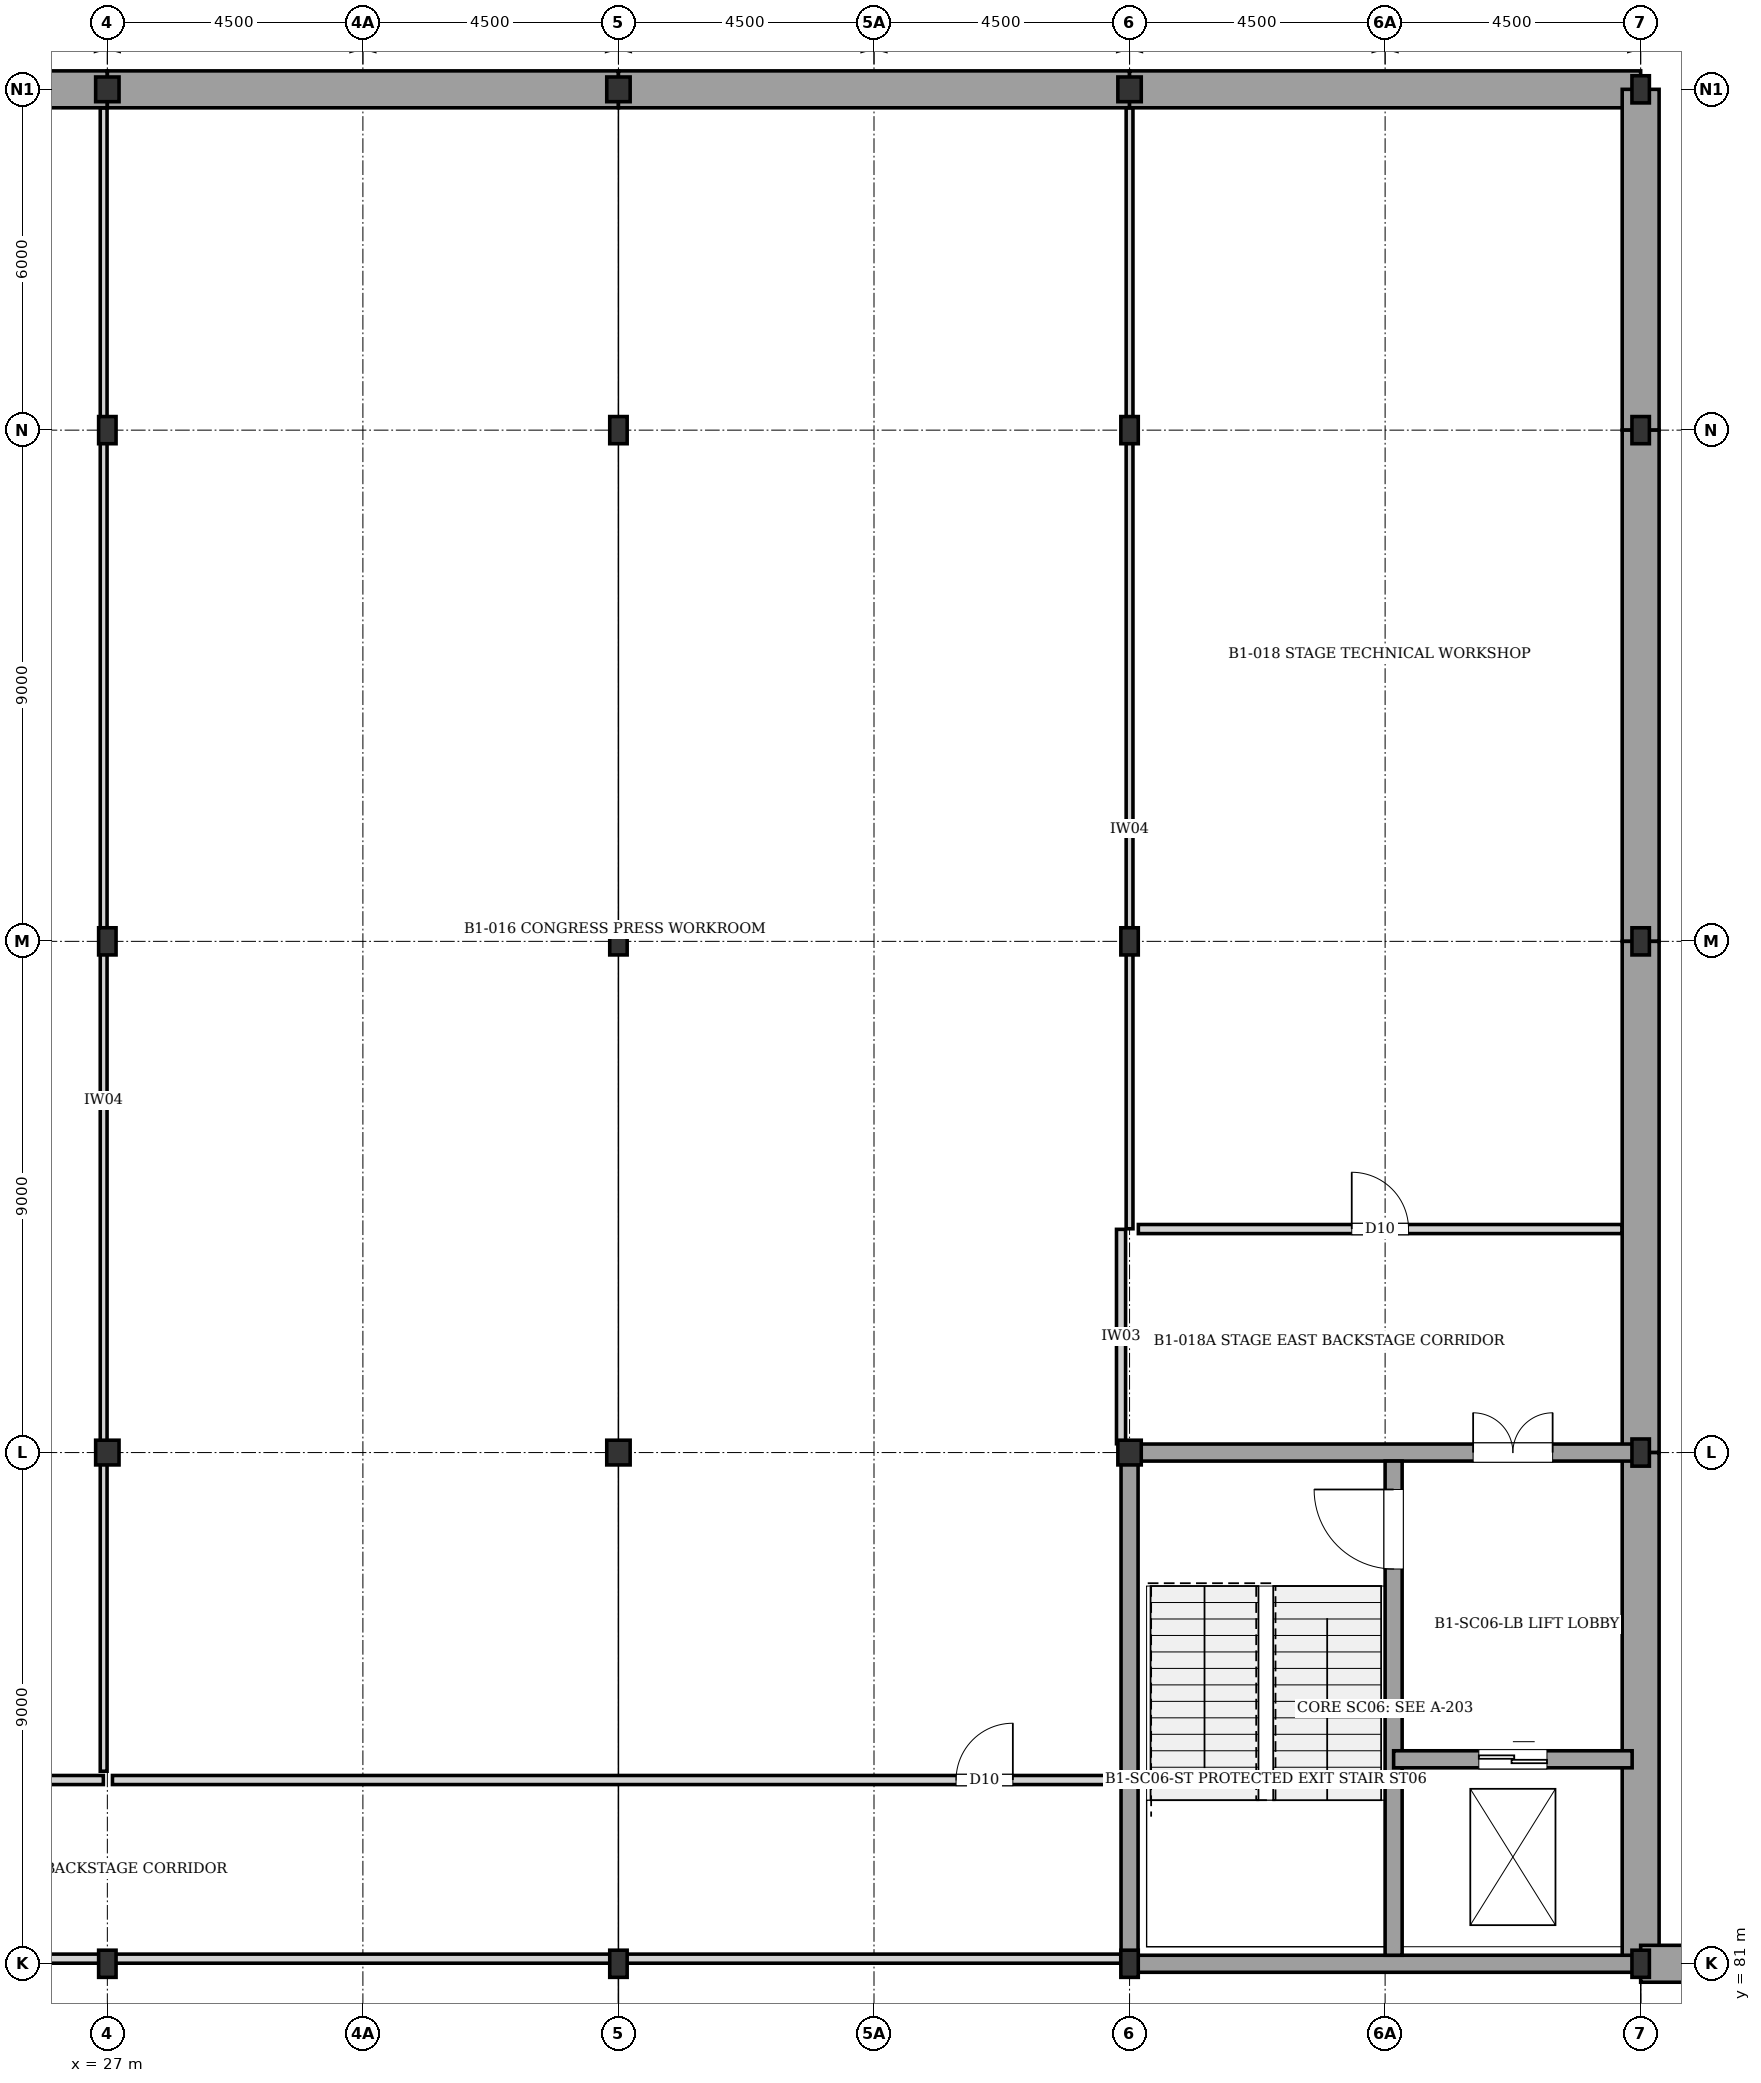
"""IFC4 building model, lengths in metres.
Left out: names, types, materials, properties, quantities, classifications, styles, units other than length and angle.
Written with IfcOpenShell. Run it as: python <this file> out.ifc"""

import sys

from ifc_helpers import new_model, si_unit, direction, frame, frame_2d, origin, origin_2d, place, context, subcontext, project, spatial, rectangle, i_section, extrude, element, fill, save


model = new_model("IFC4")
c1 = context("Model", 3, precision=1e-05, world=origin(), true_north=direction((0.0, 1.0)))
c2 = subcontext(c1, "Body", "Model", "MODEL_VIEW")
j1 = project(units=[si_unit("LENGTHUNIT", "METRE"), si_unit("PLANEANGLEUNIT", "RADIAN")], contexts=[c1])
p1 = place(None, origin())
s1 = spatial("IfcSite", under=j1, at=p1, CompositionType="ELEMENT")
p2 = place(p1, origin())
s2 = spatial("IfcBuilding", under=s1, at=p2, CompositionType="ELEMENT")
p3 = place(p2, frame((0.0, 0.0, -4.48)))
s3 = spatial("IfcBuildingStorey", under=s2, at=p3, CompositionType="ELEMENT", Elevation=-4.48)
p4 = place(p3, frame((27.0, 81.0, 0.0), z_axis=(0.0, 0.0, 1.0), x_axis=(1.0, 0.0, 0.0)))
e1 = element("IfcColumn", 1, at=p4, inside=s3, PredefinedType="COLUMN", context=c2, shape_type="SweptSolid", body=[
    extrude(i_section(OverallWidth=0.307, OverallDepth=0.478, WebThickness=0.021, FlangeThickness=0.04, at=origin_2d()), origin(), (0.0, 0.0, 1.0), 4.48),
])
p5 = place(p3, frame((27.0, 90.0, 0.0), z_axis=(0.0, 0.0, 1.0), x_axis=(1.0, 0.0, 0.0)))
e2 = element("IfcColumn", 2, at=p5, inside=s3, PredefinedType="COLUMN", context=c2, shape_type="SweptSolid", body=[
    extrude(i_section(OverallWidth=0.412, OverallDepth=0.435, WebThickness=0.027, FlangeThickness=0.046, at=origin_2d()), origin(), (0.0, 0.0, 1.0), 4.48),
])
for number, where, z_axis, x_axis in (
    (3, (27.0, 99.0, 0.0), (0.0, 0.0, 1.0), (1.0, 0.0, 0.0)),
    (4, (27.0, 108.0, 0.0), (0.0, 0.0, 1.0), (1.0, 0.0, 0.0)),
):
    element("IfcColumn", number, at=place(p3, frame(where, z_axis=z_axis, x_axis=x_axis)), inside=s3, PredefinedType="COLUMN", context=c2, shape_type="SweptSolid", body=[
        extrude(i_section(OverallWidth=0.307, OverallDepth=0.478, WebThickness=0.021, FlangeThickness=0.04, at=origin_2d()), origin(), (0.0, 0.0, 1.0), 4.48),
    ])
p6 = place(p3, frame((27.0, 114.0, 0.0), z_axis=(0.0, 0.0, 1.0), x_axis=(1.0, 0.0, 0.0)))
e5 = element("IfcColumn", 5, at=p6, inside=s3, PredefinedType="COLUMN", context=c2, shape_type="SweptSolid", body=[
    extrude(i_section(OverallWidth=0.412, OverallDepth=0.435, WebThickness=0.027, FlangeThickness=0.046, at=origin_2d()), origin(), (0.0, 0.0, 1.0), 4.48),
])
p7 = place(p3, frame((36.0, 81.0, 0.0), z_axis=(0.0, 0.0, 1.0), x_axis=(1.0, 0.0, 0.0)))
e6 = element("IfcColumn", 6, at=p7, inside=s3, PredefinedType="COLUMN", context=c2, shape_type="SweptSolid", body=[
    extrude(i_section(OverallWidth=0.307, OverallDepth=0.478, WebThickness=0.021, FlangeThickness=0.04, at=origin_2d()), origin(), (0.0, 0.0, 1.0), 4.48),
])
p8 = place(p3, frame((36.0, 90.0, 0.0), z_axis=(0.0, 0.0, 1.0), x_axis=(1.0, 0.0, 0.0)))
e7 = element("IfcColumn", 7, at=p8, inside=s3, PredefinedType="COLUMN", context=c2, shape_type="SweptSolid", body=[
    extrude(i_section(OverallWidth=0.412, OverallDepth=0.435, WebThickness=0.027, FlangeThickness=0.046, at=origin_2d()), origin(), (0.0, 0.0, 1.0), 4.48),
])
for number, where, z_axis, x_axis in (
    (8, (36.0, 99.0, 0.0), (0.0, 0.0, 1.0), (1.0, 0.0, 0.0)),
    (9, (36.0, 108.0, 0.0), (0.0, 0.0, 1.0), (1.0, 0.0, 0.0)),
):
    element("IfcColumn", number, at=place(p3, frame(where, z_axis=z_axis, x_axis=x_axis)), inside=s3, PredefinedType="COLUMN", context=c2, shape_type="SweptSolid", body=[
        extrude(i_section(OverallWidth=0.307, OverallDepth=0.478, WebThickness=0.021, FlangeThickness=0.04, at=origin_2d()), origin(), (0.0, 0.0, 1.0), 4.48),
    ])
p9 = place(p3, frame((36.0, 114.0, 0.0), z_axis=(0.0, 0.0, 1.0), x_axis=(1.0, 0.0, 0.0)))
e10 = element("IfcColumn", 10, at=p9, inside=s3, PredefinedType="COLUMN", context=c2, shape_type="SweptSolid", body=[
    extrude(i_section(OverallWidth=0.412, OverallDepth=0.435, WebThickness=0.027, FlangeThickness=0.046, at=origin_2d()), origin(), (0.0, 0.0, 1.0), 4.48),
])
p10 = place(p3, frame((45.0, 81.0, 0.0), z_axis=(0.0, 0.0, 1.0), x_axis=(1.0, 0.0, 0.0)))
e11 = element("IfcColumn", 11, at=p10, inside=s3, PredefinedType="COLUMN", context=c2, shape_type="SweptSolid", body=[
    extrude(i_section(OverallWidth=0.307, OverallDepth=0.478, WebThickness=0.021, FlangeThickness=0.04, at=origin_2d()), origin(), (0.0, 0.0, 1.0), 4.48),
])
p11 = place(p3, frame((45.0, 90.0, 0.0), z_axis=(0.0, 0.0, 1.0), x_axis=(1.0, 0.0, 0.0)))
e12 = element("IfcColumn", 12, at=p11, inside=s3, PredefinedType="COLUMN", context=c2, shape_type="SweptSolid", body=[
    extrude(i_section(OverallWidth=0.412, OverallDepth=0.435, WebThickness=0.027, FlangeThickness=0.046, at=origin_2d()), origin(), (0.0, 0.0, 1.0), 4.48),
])
for number, where, z_axis, x_axis in (
    (13, (45.0, 99.0, 0.0), (0.0, 0.0, 1.0), (1.0, 0.0, 0.0)),
    (14, (45.0, 108.0, 0.0), (0.0, 0.0, 1.0), (1.0, 0.0, 0.0)),
):
    element("IfcColumn", number, at=place(p3, frame(where, z_axis=z_axis, x_axis=x_axis)), inside=s3, PredefinedType="COLUMN", context=c2, shape_type="SweptSolid", body=[
        extrude(i_section(OverallWidth=0.307, OverallDepth=0.478, WebThickness=0.021, FlangeThickness=0.04, at=origin_2d()), origin(), (0.0, 0.0, 1.0), 4.48),
    ])
p12 = place(p3, frame((45.0, 114.0, 0.0), z_axis=(0.0, 0.0, 1.0), x_axis=(1.0, 0.0, 0.0)))
e15 = element("IfcColumn", 15, at=p12, inside=s3, PredefinedType="COLUMN", context=c2, shape_type="SweptSolid", body=[
    extrude(i_section(OverallWidth=0.412, OverallDepth=0.435, WebThickness=0.027, FlangeThickness=0.046, at=origin_2d()), origin(), (0.0, 0.0, 1.0), 4.48),
])
for number, where, z_axis, x_axis in (
    (16, (54.0, 81.0, 0.0), (0.0, 0.0, 1.0), (1.0, 0.0, 0.0)),
    (17, (54.0, 90.0, 0.0), (0.0, 0.0, 1.0), (1.0, 0.0, 0.0)),
    (18, (54.0, 99.0, 0.0), (0.0, 0.0, 1.0), (1.0, 0.0, 0.0)),
    (19, (54.0, 108.0, 0.0), (0.0, 0.0, 1.0), (1.0, 0.0, 0.0)),
    (20, (54.0, 114.0, 0.0), (0.0, 0.0, 1.0), (1.0, 0.0, 0.0)),
):
    element("IfcColumn", number, at=place(p3, frame(where, z_axis=z_axis, x_axis=x_axis)), inside=s3, PredefinedType="COLUMN", context=c2, shape_type="SweptSolid", body=[
        extrude(i_section(OverallWidth=0.307, OverallDepth=0.478, WebThickness=0.021, FlangeThickness=0.04, at=origin_2d()), origin(), (0.0, 0.0, 1.0), 4.48),
    ])
for number, where, z_axis, x_axis in (
    (21, (18.0, 114.0, 0.0), (0.0, 0.0, 1.0), (1.0, 0.0, 0.0)),
    (22, (27.0, 114.0, 0.0), (0.0, 0.0, 1.0), (1.0, 0.0, 0.0)),
    (23, (36.0, 114.0, 0.0), (0.0, 0.0, 1.0), (1.0, 0.0, 0.0)),
    (24, (45.0, 114.0, 0.0), (0.0, 0.0, 1.0), (1.0, 0.0, 0.0)),
):
    element("IfcWall", number, at=place(p3, frame(where, z_axis=z_axis, x_axis=x_axis)), inside=s3, PredefinedType="USERDEFINED", context=c2, shape_type="SweptSolid", body=[
        extrude(rectangle(XDim=9.0, YDim=0.65, at=frame_2d((4.5, 0.0))), origin(), (0.0, 0.0, 1.0), 4.18),
    ])
p13 = place(p3, frame((54.0, 114.0, 0.0), z_axis=(0.0, 0.0, 1.0), x_axis=(0.0, -1.0, 0.0)))
e25 = element("IfcWall", 25, at=p13, inside=s3, PredefinedType="USERDEFINED", context=c2, shape_type="SweptSolid", body=[
    extrude(rectangle(XDim=6.0, YDim=0.65, at=frame_2d((3.0, 0.0))), origin(), (0.0, 0.0, 1.0), 4.18),
])
for number, where, z_axis, x_axis in (
    (26, (54.0, 108.0, 0.0), (0.0, 0.0, 1.0), (0.0, -1.0, 0.0)),
    (27, (54.0, 99.0, 0.0), (0.0, 0.0, 1.0), (0.0, -1.0, 0.0)),
    (28, (54.0, 90.0, 0.0), (0.0, 0.0, 1.0), (0.0, -1.0, 0.0)),
):
    element("IfcWall", number, at=place(p3, frame(where, z_axis=z_axis, x_axis=x_axis)), inside=s3, PredefinedType="USERDEFINED", context=c2, shape_type="SweptSolid", body=[
        extrude(rectangle(XDim=9.0, YDim=0.65, at=frame_2d((4.5, 0.0))), origin(), (0.0, 0.0, 1.0), 4.18),
    ])
p14 = place(p3, frame((54.0, 81.0, 0.0), z_axis=(0.0, 0.0, 1.0), x_axis=(1.0, 0.0, 0.0)))
e29 = element("IfcWall", 29, at=p14, inside=s3, PredefinedType="USERDEFINED", context=c2, shape_type="SweptSolid", body=[
    extrude(rectangle(XDim=9.0, YDim=0.65, at=frame_2d((4.5, 0.0))), origin(), (0.0, 0.0, 1.0), 4.03),
])
p15 = place(p3, frame((45.0, 81.0, 0.0), z_axis=(0.0, 0.0, 1.0), x_axis=(1.0, 0.0, 0.0)))
e30 = element("IfcWall", 30, at=p15, inside=s3, PredefinedType="SHEAR", context=c2, shape_type="SweptSolid", body=[
    extrude(rectangle(XDim=9.0, YDim=0.3, at=frame_2d((4.5, 0.0))), origin(), (0.0, 0.0, 1.0), 4.18),
])
p16 = place(p3, frame((45.0, 90.0, 0.0), z_axis=(0.0, 0.0, 1.0), x_axis=(1.0, 0.0, 0.0)))
e31 = element("IfcWall", 31, at=p16, inside=s3, PredefinedType="SHEAR", context=c2, shape_type="SweptSolid", body=[
    extrude(rectangle(XDim=9.0, YDim=0.3, at=frame_2d((4.5, 0.0))), origin(), (0.0, 0.0, 1.0), 4.18),
])
p17 = place(p16, frame((6.05, 0.0, 0.0)))
e32 = element("IfcOpeningElement", 32, at=p17, cuts=e31, PredefinedType="OPENING", context=c2, shape_type="SweptSolid", body=[
    extrude(rectangle(XDim=1.4, YDim=2.02, at=frame_2d((0.7, 1.01))), frame((0.0, 0.16, 0.0), z_axis=(0.0, -1.0, 0.0), x_axis=(1.0, 0.0, 0.0)), (0.0, 0.0, 1.0), 0.32),
])
p18 = place(p3, frame((45.0, 81.0, 0.0), z_axis=(0.0, 0.0, 1.0), x_axis=(0.0, 1.0, 0.0)))
e33 = element("IfcWall", 33, at=p18, inside=s3, PredefinedType="SHEAR", context=c2, shape_type="SweptSolid", body=[
    extrude(rectangle(XDim=9.0, YDim=0.3, at=frame_2d((4.5, 0.0))), origin(), (0.0, 0.0, 1.0), 4.18),
])
p19 = place(p3, frame((49.65, 81.15, 0.0), z_axis=(0.0, 0.0, 1.0), x_axis=(0.0, 1.0, 0.0)))
e34 = element("IfcWall", 34, at=p19, inside=s3, PredefinedType="SHEAR", context=c2, shape_type="SweptSolid", body=[
    extrude(rectangle(XDim=8.7, YDim=0.3, at=frame_2d((4.35, 0.0))), origin(), (0.0, 0.0, 1.0), 4.18),
])
p20 = place(p19, frame((6.8, 0.0, 0.0)))
e35 = element("IfcOpeningElement", 35, at=p20, cuts=e34, PredefinedType="OPENING", context=c2, shape_type="SweptSolid", body=[
    extrude(rectangle(XDim=1.4, YDim=2.02, at=frame_2d((0.7, 1.01))), frame((0.0, 0.16, 0.0), z_axis=(0.0, -1.0, 0.0), x_axis=(1.0, 0.0, 0.0)), (0.0, 0.0, 1.0), 0.32),
])
p21 = place(p3, frame((49.65, 84.6, 0.0), z_axis=(0.0, 0.0, 1.0), x_axis=(1.0, 0.0, 0.0)))
e36 = element("IfcWall", 36, at=p21, inside=s3, PredefinedType="SHEAR", context=c2, shape_type="SweptSolid", body=[
    extrude(rectangle(XDim=4.2, YDim=0.3, at=frame_2d((2.1, 0.0))), origin(), (0.0, 0.0, 1.0), 4.18),
])
p22 = place(p21, frame((1.5, 0.0, 0.0)))
e37 = element("IfcOpeningElement", 37, at=p22, cuts=e36, PredefinedType="OPENING", context=c2, shape_type="SweptSolid", body=[
    extrude(rectangle(XDim=1.2, YDim=2.2, at=frame_2d((0.6, 1.1))), frame((0.0, 0.16, 0.0), z_axis=(0.0, -1.0, 0.0), x_axis=(1.0, 0.0, 0.0)), (0.0, 0.0, 1.0), 0.32),
])
p23 = place(p3, frame((11.94, 84.235, 0.0), z_axis=(0.0, 0.0, 1.0), x_axis=(1.0, 0.0, 0.0)))
e38 = element("IfcWall", 38, at=p23, inside=s3, PredefinedType="PARTITIONING", context=c2, shape_type="SweptSolid", body=[
    extrude(rectangle(XDim=14.99, YDim=0.16, at=frame_2d((7.495, 0.0))), origin(), (0.0, 0.0, 1.0), 4.18),
])
p24 = place(p3, frame((26.935, 84.39, 0.0), z_axis=(0.0, 0.0, 1.0), x_axis=(0.0, 1.0, 0.0)))
e39 = element("IfcWall", 39, at=p24, inside=s3, PredefinedType="PARTITIONING", context=c2, shape_type="SweptSolid", body=[
    extrude(rectangle(XDim=23.63, YDim=0.12, at=frame_2d((11.815, 0.0))), origin(), (0.0, 0.0, 1.0), 3.28),
])
p25 = place(p3, frame((44.85, 90.155, 0.0), z_axis=(0.0, 0.0, 1.0), x_axis=(0.0, 1.0, 0.0)))
e40 = element("IfcWall", 40, at=p25, inside=s3, PredefinedType="PARTITIONING", context=c2, shape_type="SweptSolid", body=[
    extrude(rectangle(XDim=3.775, YDim=0.16, at=frame_2d((1.887, 0.0))), origin(), (0.0, 0.0, 1.0), 3.28),
])
p26 = place(p3, frame((45.0, 93.94, 0.0), z_axis=(0.0, 0.0, 1.0), x_axis=(0.0, 1.0, 0.0)))
e41 = element("IfcWall", 41, at=p26, inside=s3, PredefinedType="PARTITIONING", context=c2, shape_type="SweptSolid", body=[
    extrude(rectangle(XDim=14.08, YDim=0.12, at=frame_2d((7.04, 0.0))), origin(), (0.0, 0.0, 1.0), 3.28),
])
p27 = place(p3, frame((27.09, 84.235, 0.0), z_axis=(0.0, 0.0, 1.0), x_axis=(1.0, 0.0, 0.0)))
e42 = element("IfcWall", 42, at=p27, inside=s3, PredefinedType="PARTITIONING", context=c2, shape_type="SweptSolid", body=[
    extrude(rectangle(XDim=17.755, YDim=0.16, at=frame_2d((8.877, 0.0))), origin(), (0.0, 0.0, 1.0), 4.18),
])
p28 = place(p27, frame((14.855, 0.0, 0.0)))
e43 = element("IfcOpeningElement", 43, at=p28, cuts=e42, PredefinedType="OPENING", context=c2, shape_type="SweptSolid", body=[
    extrude(rectangle(XDim=1.0, YDim=2.1, at=frame_2d((0.5, 1.05))), frame((0.0, 0.09, 0.0), z_axis=(0.0, -1.0, 0.0), x_axis=(1.0, 0.0, 0.0)), (0.0, 0.0, 1.0), 0.18),
])
p29 = place(p3, frame((9.155, 81.09, 0.0), z_axis=(0.0, 0.0, 1.0), x_axis=(1.0, 0.0, 0.0)))
e44 = element("IfcWall", 44, at=p29, inside=s3, PredefinedType="PARTITIONING", context=c2, shape_type="SweptSolid", body=[
    extrude(rectangle(XDim=35.69, YDim=0.16, at=frame_2d((17.845, 0.0))), origin(), (0.0, 0.0, 1.0), 3.28),
])
p30 = place(p29, frame((12.812, 0.0, 0.0)))
e45 = element("IfcOpeningElement", 45, at=p30, cuts=e44, PredefinedType="OPENING", context=c2, shape_type="SweptSolid", body=[
    extrude(rectangle(XDim=1.5, YDim=2.1, at=frame_2d((0.75, 1.05))), frame((0.0, 0.09, 0.0), z_axis=(0.0, -1.0, 0.0), x_axis=(1.0, 0.0, 0.0)), (0.0, 0.0, 1.0), 0.18),
])
p31 = place(p3, frame((45.155, 93.935, 0.0), z_axis=(0.0, 0.0, 1.0), x_axis=(1.0, 0.0, 0.0)))
e46 = element("IfcWall", 46, at=p31, inside=s3, PredefinedType="PARTITIONING", context=c2, shape_type="SweptSolid", body=[
    extrude(rectangle(XDim=8.515, YDim=0.16, at=frame_2d((4.257, 0.0))), origin(), (0.0, 0.0, 1.0), 4.18),
])
p32 = place(p31, frame((3.758, 0.0, 0.0)))
e47 = element("IfcOpeningElement", 47, at=p32, cuts=e46, PredefinedType="OPENING", context=c2, shape_type="SweptSolid", body=[
    extrude(rectangle(XDim=1.0, YDim=2.1, at=frame_2d((0.5, 1.05))), frame((0.0, 0.09, 0.0), z_axis=(0.0, -1.0, 0.0), x_axis=(1.0, 0.0, 0.0)), (0.0, 0.0, 1.0), 0.18),
])
for number, where, z_axis, x_axis in (
    (48, (26.935, 108.02, 0.0), (0.0, 0.0, 1.0), (0.0, 1.0, 0.0)),
    (49, (45.0, 108.02, 0.0), (0.0, 0.0, 1.0), (0.0, 1.0, 0.0)),
):
    element("IfcWall", number, at=place(p3, frame(where, z_axis=z_axis, x_axis=x_axis)), inside=s3, PredefinedType="PARTITIONING", context=c2, shape_type="SweptSolid", body=[
        extrude(rectangle(XDim=5.65, YDim=0.12, at=frame_2d((2.825, 0.0))), origin(), (0.0, 0.0, 1.0), 3.48),
    ])
p33 = place(p17, origin())
e50 = element("IfcDoor", 50, at=p33, inside=s3, OperationType="DOUBLE_DOOR_SINGLE_SWING", PredefinedType="DOOR", context=c2, shape_type="SweptSolid", body=[
    extrude(rectangle(XDim=1.4, YDim=2.02, at=frame_2d((0.7, 1.01))), frame((0.0, 0.025, 0.0), z_axis=(0.0, -1.0, 0.0), x_axis=(1.0, 0.0, 0.0)), (0.0, 0.0, 1.0), 0.05),
])
fill(e32, e50)
p34 = place(p20, origin())
e51 = element("IfcDoor", 51, at=p34, inside=s3, OperationType="SINGLE_SWING_RIGHT", PredefinedType="DOOR", context=c2, shape_type="SweptSolid", body=[
    extrude(rectangle(XDim=1.4, YDim=2.02, at=frame_2d((0.7, 1.01))), frame((0.0, 0.025, 0.0), z_axis=(0.0, -1.0, 0.0), x_axis=(1.0, 0.0, 0.0)), (0.0, 0.0, 1.0), 0.05),
])
fill(e35, e51)
p35 = place(p22, origin())
e52 = element("IfcDoor", 52, at=p35, inside=s3, OperationType="DOUBLE_DOOR_SLIDING", PredefinedType="DOOR", context=c2, shape_type="SweptSolid", body=[
    extrude(rectangle(XDim=1.2, YDim=2.2, at=frame_2d((0.6, 1.1))), frame((0.0, 0.025, 0.0), z_axis=(0.0, -1.0, 0.0), x_axis=(1.0, 0.0, 0.0)), (0.0, 0.0, 1.0), 0.05),
])
fill(e37, e52)
p36 = place(p28, origin())
e53 = element("IfcDoor", 53, at=p36, inside=s3, OperationType="SINGLE_SWING_RIGHT", PredefinedType="DOOR", context=c2, shape_type="SweptSolid", body=[
    extrude(rectangle(XDim=1.0, YDim=2.1, at=frame_2d((0.5, 1.05))), frame((0.0, 0.025, 0.0), z_axis=(0.0, -1.0, 0.0), x_axis=(1.0, 0.0, 0.0)), (0.0, 0.0, 1.0), 0.05),
])
fill(e43, e53)
p37 = place(p32, origin())
e54 = element("IfcDoor", 54, at=p37, inside=s3, OperationType="SINGLE_SWING_LEFT", PredefinedType="DOOR", context=c2, shape_type="SweptSolid", body=[
    extrude(rectangle(XDim=1.0, YDim=2.1, at=frame_2d((0.5, 1.05))), frame((0.0, 0.025, 0.0), z_axis=(0.0, -1.0, 0.0), x_axis=(1.0, 0.0, 0.0)), (0.0, 0.0, 1.0), 0.05),
])
fill(e47, e54)
save(model, sys.argv[1])
